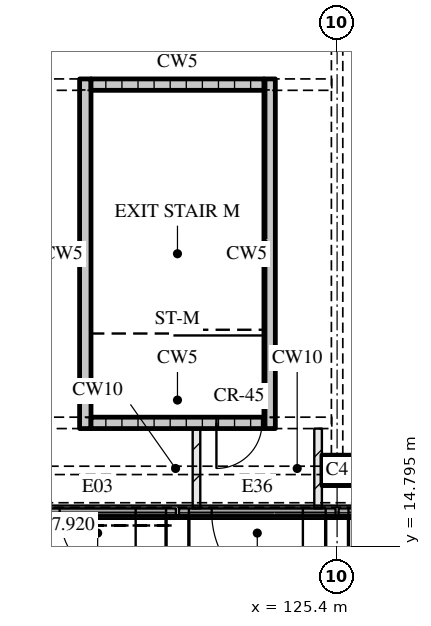
"""IFC4 building model, lengths in metres.
Left out: names, types, materials, properties, quantities, classifications, styles, units other than length and angle.
Written with IfcOpenShell. Run it as: python <this file> out.ifc"""

import sys

from ifc_helpers import new_model, si_unit, direction, frame, frame_2d, origin, origin_2d, place, context, subcontext, project, spatial, rectangle, extrude, element, fill, save


model = new_model("IFC4")
c1 = context("Model", 3, precision=1e-05, world=origin(), true_north=direction((0.0, 1.0)))
c2 = subcontext(c1, "Body", "Model", "MODEL_VIEW")
j1 = project(units=[si_unit("LENGTHUNIT", "METRE"), si_unit("PLANEANGLEUNIT", "RADIAN")], contexts=[c1])
p1 = place(None, origin())
s1 = spatial("IfcSite", under=j1, at=p1, CompositionType="ELEMENT")
p2 = place(p1, origin())
s2 = spatial("IfcBuilding", under=s1, at=p2, CompositionType="ELEMENT")
p3 = place(p2, origin())
s3 = spatial("IfcBuildingStorey", under=s2, at=p3, CompositionType="ELEMENT", Elevation=0.0)
p4 = place(p3, frame((125.4, 16.8, 0.0), z_axis=(0.0, 0.0, 1.0), x_axis=(1.0, 0.0, 0.0)))
e1 = element("IfcColumn", 1, at=p4, inside=s3, PredefinedType="COLUMN", context=c2, shape_type="SweptSolid", body=[
    extrude(rectangle(XDim=0.8, YDim=0.8, at=origin_2d()), origin(), (0.0, 0.0, 1.0), 9.0),
])
p5 = place(p3, frame((121.16, 15.7, 0.0), z_axis=(0.0, 0.0, 1.0), x_axis=(-1.0, 0.0, 0.0)))
e2 = element("IfcWall", 2, at=p5, inside=s3, PredefinedType="SOLIDWALL", context=c2, shape_type="SweptSolid", body=[
    extrude(rectangle(XDim=4.12, YDim=0.2, at=frame_2d((2.06, 0.0))), origin(), (0.0, 0.0, 1.0), 8.7),
])
p6 = place(p5, frame((1.06, 0.0, 0.0)))
e3 = element("IfcOpeningElement", 3, at=p6, cuts=e2, PredefinedType="OPENING", context=c2, shape_type="SweptSolid", body=[
    extrude(rectangle(XDim=2.0, YDim=2.4, at=frame_2d((1.0, 1.2))), frame((0.0, 0.11, 0.0), z_axis=(0.0, -1.0, 0.0), x_axis=(1.0, 0.0, 0.0)), (0.0, 0.0, 1.0), 0.22),
])
p7 = place(p5, frame((0.26, 0.0, 2.7)))
e4 = element("IfcOpeningElement", 4, at=p7, cuts=e2, PredefinedType="OPENING", context=c2, shape_type="SweptSolid", body=[
    extrude(rectangle(XDim=3.6, YDim=5.6, at=frame_2d((1.8, 2.8))), frame((0.0, 0.11, 0.0), z_axis=(0.0, -1.0, 0.0), x_axis=(1.0, 0.0, 0.0)), (0.0, 0.0, 1.0), 0.22),
])
p8 = place(p3, frame((129.56, 15.7, 0.0), z_axis=(0.0, 0.0, 1.0), x_axis=(-1.0, 0.0, 0.0)))
e5 = element("IfcWall", 5, at=p8, inside=s3, PredefinedType="SOLIDWALL", context=c2, shape_type="SweptSolid", body=[
    extrude(rectangle(XDim=4.12, YDim=0.2, at=frame_2d((2.06, 0.0))), origin(), (0.0, 0.0, 1.0), 8.7),
])
p9 = place(p8, frame((0.86, 0.0, 0.0)))
e6 = element("IfcOpeningElement", 6, at=p9, cuts=e5, PredefinedType="OPENING", context=c2, shape_type="SweptSolid", body=[
    extrude(rectangle(XDim=2.4, YDim=2.4, at=frame_2d((1.2, 1.2))), frame((0.0, 0.11, 0.0), z_axis=(0.0, -1.0, 0.0), x_axis=(1.0, 0.0, 0.0)), (0.0, 0.0, 1.0), 0.22),
])
p10 = place(p8, frame((0.26, 0.0, 2.7)))
e7 = element("IfcOpeningElement", 7, at=p10, cuts=e5, PredefinedType="OPENING", context=c2, shape_type="SweptSolid", body=[
    extrude(rectangle(XDim=3.6, YDim=5.6, at=frame_2d((1.8, 2.8))), frame((0.0, 0.11, 0.0), z_axis=(0.0, -1.0, 0.0), x_axis=(1.0, 0.0, 0.0)), (0.0, 0.0, 1.0), 0.22),
])
p11 = place(p3, frame((125.36, 15.7, 0.0), z_axis=(0.0, 0.0, 1.0), x_axis=(-1.0, 0.0, 0.0)))
e8 = element("IfcWall", 8, at=p11, inside=s3, PredefinedType="SOLIDWALL", context=c2, shape_type="SweptSolid", body=[
    extrude(rectangle(XDim=4.12, YDim=0.2, at=frame_2d((2.06, 0.0))), origin(), (0.0, 0.0, 1.0), 8.7),
])
p12 = place(p11, frame((0.86, 0.0, 0.0)))
e9 = element("IfcOpeningElement", 9, at=p12, cuts=e8, PredefinedType="OPENING", context=c2, shape_type="SweptSolid", body=[
    extrude(rectangle(XDim=2.4, YDim=2.4, at=frame_2d((1.2, 1.2))), frame((0.0, 0.11, 0.0), z_axis=(0.0, -1.0, 0.0), x_axis=(1.0, 0.0, 0.0)), (0.0, 0.0, 1.0), 0.22),
])
p13 = place(p11, frame((0.26, 0.0, 2.7)))
e10 = element("IfcOpeningElement", 10, at=p13, cuts=e8, PredefinedType="OPENING", context=c2, shape_type="SweptSolid", body=[
    extrude(rectangle(XDim=3.6, YDim=5.6, at=frame_2d((1.8, 2.8))), frame((0.0, 0.11, 0.0), z_axis=(0.0, -1.0, 0.0), x_axis=(1.0, 0.0, 0.0)), (0.0, 0.0, 1.0), 0.22),
])
p14 = place(p3, frame((118.775, 17.9, 0.0), z_axis=(0.0, 0.0, 1.0), x_axis=(0.0, 1.0, 0.0)))
e11 = element("IfcWall", 11, at=p14, inside=s3, PredefinedType="SOLIDWALL", context=c2, shape_type="SweptSolid", body=[
    extrude(rectangle(XDim=9.2, YDim=0.3, at=frame_2d((4.6, 0.0))), origin(), (0.0, 0.0, 1.0), 8.7),
])
p15 = place(p3, frame((118.925, 18.05, 0.0), z_axis=(0.0, 0.0, 1.0), x_axis=(1.0, 0.0, 0.0)))
e12 = element("IfcWall", 12, at=p15, inside=s3, PredefinedType="SOLIDWALL", context=c2, shape_type="SweptSolid", body=[
    extrude(rectangle(XDim=4.55, YDim=0.3, at=frame_2d((2.275, 0.0))), origin(), (0.0, 0.0, 1.0), 8.7),
])
p16 = place(p15, frame((3.3, 0.0, 0.0)))
e13 = element("IfcOpeningElement", 13, at=p16, cuts=e12, PredefinedType="OPENING", context=c2, shape_type="SweptSolid", body=[
    extrude(rectangle(XDim=1.2, YDim=2.1, at=frame_2d((0.6, 1.05))), frame((0.0, 0.16, 0.0), z_axis=(0.0, -1.0, 0.0), x_axis=(1.0, 0.0, 0.0)), (0.0, 0.0, 1.0), 0.32),
])
p17 = place(p3, frame((123.625, 17.9, 0.0), z_axis=(0.0, 0.0, 1.0), x_axis=(0.0, 1.0, 0.0)))
e14 = element("IfcWall", 14, at=p17, inside=s3, PredefinedType="SOLIDWALL", context=c2, shape_type="SweptSolid", body=[
    extrude(rectangle(XDim=9.2, YDim=0.3, at=frame_2d((4.6, 0.0))), origin(), (0.0, 0.0, 1.0), 8.7),
])
p18 = place(p3, frame((118.925, 26.95, 0.0), z_axis=(0.0, 0.0, 1.0), x_axis=(1.0, 0.0, 0.0)))
e15 = element("IfcWall", 15, at=p18, inside=s3, PredefinedType="SOLIDWALL", context=c2, shape_type="SweptSolid", body=[
    extrude(rectangle(XDim=4.55, YDim=0.3, at=frame_2d((2.275, 0.0))), origin(), (0.0, 0.0, 1.0), 8.7),
])
for number, where, z_axis, x_axis in (
    (16, (121.7, 15.8, 0.0), (0.0, 0.0, 1.0), (0.0, 1.0, 0.0)),
    (17, (124.9, 15.8, 0.0), (0.0, 0.0, 1.0), (0.0, 1.0, 0.0)),
):
    element("IfcWall", number, at=place(p3, frame(where, z_axis=z_axis, x_axis=x_axis)), inside=s3, PredefinedType="PARTITIONING", context=c2, shape_type="SweptSolid", body=[
        extrude(rectangle(XDim=2.1, YDim=0.2, at=frame_2d((1.05, 0.0))), origin(), (0.0, 0.0, 1.0), 8.7),
    ])
p19 = place(p6, origin())
e18 = element("IfcDoor", 18, at=p19, inside=s3, OperationType="DOUBLE_DOOR_SINGLE_SWING", PredefinedType="DOOR", context=c2, shape_type="SweptSolid", body=[
    extrude(rectangle(XDim=2.0, YDim=2.4, at=frame_2d((1.0, 1.2))), frame((0.0, 0.025, 0.0), z_axis=(0.0, -1.0, 0.0), x_axis=(1.0, 0.0, 0.0)), (0.0, 0.0, 1.0), 0.05),
])
fill(e3, e18)
p20 = place(p7, origin())
e19 = element("IfcWindow", 19, at=p20, inside=s3, PartitioningType="SINGLE_PANEL", PredefinedType="WINDOW", context=c2, shape_type="SweptSolid", body=[
    extrude(rectangle(XDim=3.6, YDim=5.6, at=frame_2d((1.8, 2.8))), frame((0.0, 0.03, 0.0), z_axis=(0.0, -1.0, 0.0), x_axis=(1.0, 0.0, 0.0)), (0.0, 0.0, 1.0), 0.06),
])
fill(e4, e19)
p21 = place(p10, origin())
e20 = element("IfcWindow", 20, at=p21, inside=s3, PartitioningType="SINGLE_PANEL", PredefinedType="WINDOW", context=c2, shape_type="SweptSolid", body=[
    extrude(rectangle(XDim=3.6, YDim=5.6, at=frame_2d((1.8, 2.8))), frame((0.0, 0.03, 0.0), z_axis=(0.0, -1.0, 0.0), x_axis=(1.0, 0.0, 0.0)), (0.0, 0.0, 1.0), 0.06),
])
fill(e7, e20)
p22 = place(p12, origin())
e21 = element("IfcDoor", 21, at=p22, inside=s3, OperationType="DOUBLE_DOOR_SINGLE_SWING", PredefinedType="DOOR", context=c2, shape_type="SweptSolid", body=[
    extrude(rectangle(XDim=2.4, YDim=2.4, at=frame_2d((1.2, 1.2))), frame((0.0, 0.025, 0.0), z_axis=(0.0, -1.0, 0.0), x_axis=(1.0, 0.0, 0.0)), (0.0, 0.0, 1.0), 0.05),
])
fill(e9, e21)
p23 = place(p13, origin())
e22 = element("IfcWindow", 22, at=p23, inside=s3, PartitioningType="SINGLE_PANEL", PredefinedType="WINDOW", context=c2, shape_type="SweptSolid", body=[
    extrude(rectangle(XDim=3.6, YDim=5.6, at=frame_2d((1.8, 2.8))), frame((0.0, 0.03, 0.0), z_axis=(0.0, -1.0, 0.0), x_axis=(1.0, 0.0, 0.0)), (0.0, 0.0, 1.0), 0.06),
])
fill(e10, e22)
p24 = place(p16, origin())
e23 = element("IfcDoor", 23, at=p24, inside=s3, OperationType="SINGLE_SWING_RIGHT", PredefinedType="DOOR", context=c2, shape_type="SweptSolid", body=[
    extrude(rectangle(XDim=1.2, YDim=2.1, at=frame_2d((0.6, 1.05))), frame((0.0, 0.025, 0.0), z_axis=(0.0, -1.0, 0.0), x_axis=(1.0, 0.0, 0.0)), (0.0, 0.0, 1.0), 0.05),
])
fill(e13, e23)
save(model, sys.argv[1])
